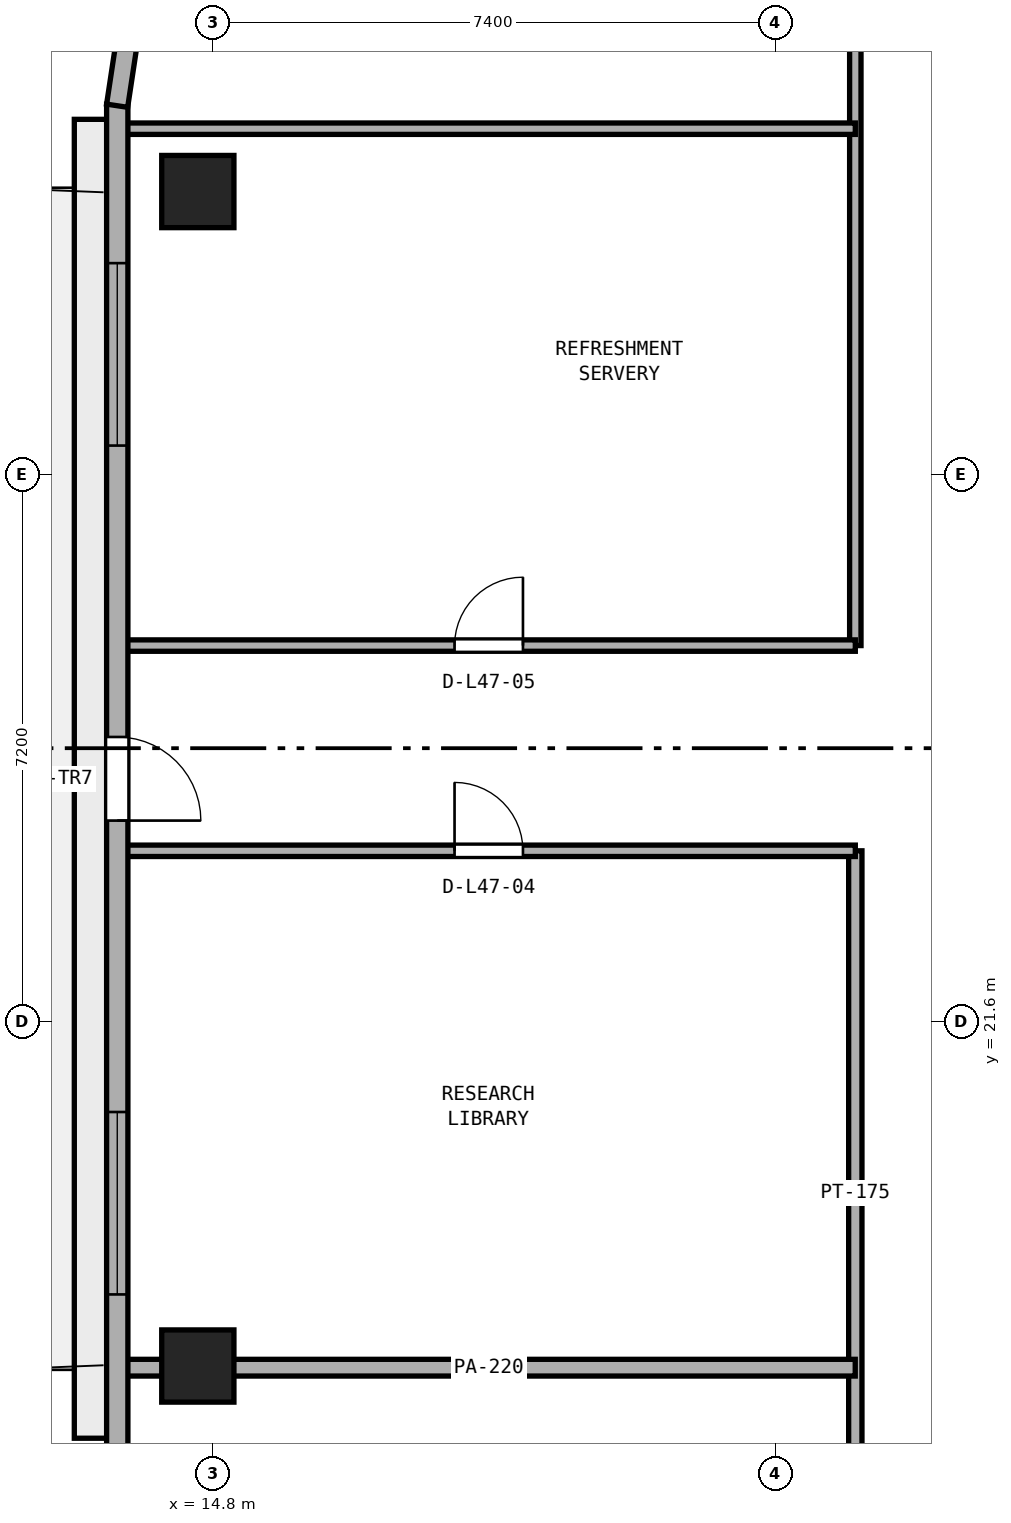
"""IFC4 building model, lengths in metres.
Left out: names, types, materials, properties, quantities, classifications, styles, units other than length and angle.
Written with IfcOpenShell. Run it as: python <this file> out.ifc"""

import sys

from ifc_helpers import new_model, si_unit, direction, frame, frame_2d, origin, origin_2d, place, context, subcontext, project, spatial, rectangle, extrude, element, fill, save


model = new_model("IFC4")
c1 = context("Model", 3, precision=1e-05, world=origin(), true_north=direction((0.0, 1.0)))
c2 = subcontext(c1, "Body", "Model", "MODEL_VIEW")
j1 = project(units=[si_unit("LENGTHUNIT", "METRE"), si_unit("PLANEANGLEUNIT", "RADIAN")], contexts=[c1])
p1 = place(None, origin())
s1 = spatial("IfcSite", under=j1, at=p1, CompositionType="ELEMENT")
p2 = place(p1, origin())
s2 = spatial("IfcBuilding", under=s1, at=p2, CompositionType="ELEMENT")
p3 = place(p2, frame((0.0, 0.0, 185.8)))
s3 = spatial("IfcBuildingStorey", under=s2, at=p3, CompositionType="ELEMENT", Elevation=185.8)
for number, where, z_axis, x_axis in (
    (1, (14.6, 32.523, 0.0), (0.0, 0.0, 1.0), (1.0, 0.0, 0.0)),
    (2, (14.6, 17.072, 0.0), (0.0, 0.0, 1.0), (1.0, 0.0, 0.0)),
):
    element("IfcColumn", number, at=place(p3, frame(where, z_axis=z_axis, x_axis=x_axis)), inside=s3, PredefinedType="COLUMN", context=c2, shape_type="SweptSolid", body=[
        extrude(rectangle(XDim=0.95, YDim=0.95, at=origin_2d()), origin(), (0.0, 0.0, 1.0), 3.8),
    ])
p4 = place(p3, frame((23.25, 14.85, 0.0), z_axis=(0.0, 0.0, 1.0), x_axis=(0.0, 1.0, 0.0)))
e3 = element("IfcWall", 3, at=p4, inside=s3, PredefinedType="PARTITIONING", context=c2, shape_type="SweptSolid", body=[
    extrude(rectangle(XDim=9.0, YDim=0.175, at=frame_2d((4.5, 0.0))), origin(), (0.0, 0.0, 1.0), 3.54),
])
p5 = place(p3, frame((23.25, 26.55, 0.0), z_axis=(0.0, 0.0, 1.0), x_axis=(0.0, 1.0, 0.0)))
e4 = element("IfcWall", 4, at=p5, inside=s3, PredefinedType="PARTITIONING", context=c2, shape_type="SweptSolid", body=[
    extrude(rectangle(XDim=9.0, YDim=0.15, at=frame_2d((4.5, 0.0))), origin(), (0.0, 0.0, 1.0), 3.54),
])
p6 = place(p3, frame((13.605, 17.05, 0.0), z_axis=(0.0, 0.0, 1.0), x_axis=(1.0, 0.0, 0.0)))
e5 = element("IfcWall", 5, at=p6, inside=s3, PredefinedType="PARTITIONING", context=c2, shape_type="SweptSolid", body=[
    extrude(rectangle(XDim=9.644, YDim=0.22, at=frame_2d((4.822, 0.0))), origin(), (0.0, 0.0, 1.0), 2.923),
])
p7 = place(p3, frame((13.605, 23.85, 0.0), z_axis=(0.0, 0.0, 1.0), x_axis=(1.0, 0.0, 0.0)))
e6 = element("IfcWall", 6, at=p7, inside=s3, PredefinedType="PARTITIONING", context=c2, shape_type="SweptSolid", body=[
    extrude(rectangle(XDim=9.645, YDim=0.15, at=frame_2d((4.823, 0.0))), origin(), (0.0, 0.0, 1.0), 3.54),
])
p8 = place(p7, frame((4.373, 0.0, 0.0)))
e7 = element("IfcOpeningElement", 7, at=p8, cuts=e6, PredefinedType="OPENING", context=c2, shape_type="SweptSolid", body=[
    extrude(rectangle(XDim=0.9, YDim=2.1, at=frame_2d((0.45, 1.05))), frame((0.0, 0.085, 0.0), z_axis=(0.0, -1.0, 0.0), x_axis=(1.0, 0.0, 0.0)), (0.0, 0.0, 1.0), 0.17),
])
p9 = place(p3, frame((13.605, 26.55, 0.0), z_axis=(0.0, 0.0, 1.0), x_axis=(1.0, 0.0, 0.0)))
e8 = element("IfcWall", 8, at=p9, inside=s3, PredefinedType="PARTITIONING", context=c2, shape_type="SweptSolid", body=[
    extrude(rectangle(XDim=9.645, YDim=0.15, at=frame_2d((4.823, 0.0))), origin(), (0.0, 0.0, 1.0), 3.54),
])
p10 = place(p9, frame((4.373, 0.0, 0.0)))
e9 = element("IfcOpeningElement", 9, at=p10, cuts=e8, PredefinedType="OPENING", context=c2, shape_type="SweptSolid", body=[
    extrude(rectangle(XDim=0.9, YDim=2.1, at=frame_2d((0.45, 1.05))), frame((0.0, 0.085, 0.0), z_axis=(0.0, -1.0, 0.0), x_axis=(1.0, 0.0, 0.0)), (0.0, 0.0, 1.0), 0.17),
])
p11 = place(p3, frame((13.605, 33.35, 0.0), z_axis=(0.0, 0.0, 1.0), x_axis=(1.0, 0.0, 0.0)))
e10 = element("IfcWall", 10, at=p11, inside=s3, PredefinedType="PARTITIONING", context=c2, shape_type="SweptSolid", body=[
    extrude(rectangle(XDim=9.645, YDim=0.15, at=frame_2d((4.823, 0.0))), origin(), (0.0, 0.0, 1.0), 3.54),
])
p12 = place(p3, frame((13.54, 33.673, 0.0), z_axis=(0.0, 0.0, 1.0), x_axis=(0.0, -1.0, 0.0)))
e11 = element("IfcWall", 11, at=p12, inside=s3, PredefinedType="STANDARD", context=c2, shape_type="SweptSolid", body=[
    extrude(rectangle(XDim=17.751, YDim=0.28, at=frame_2d((8.875, 0.0))), origin(), (0.0, 0.0, 1.0), 3.54),
])
p13 = place(p12, frame((8.326, 0.0, 0.0)))
e12 = element("IfcOpeningElement", 12, at=p13, cuts=e11, PredefinedType="OPENING", context=c2, shape_type="SweptSolid", body=[
    extrude(rectangle(XDim=1.1, YDim=2.2, at=frame_2d((0.55, 1.1))), frame((0.0, 0.15, 0.0), z_axis=(0.0, -1.0, 0.0), x_axis=(1.0, 0.0, 0.0)), (0.0, 0.0, 1.0), 0.3),
])
p14 = place(p12, frame((2.092, 0.0, 0.9)))
e13 = element("IfcOpeningElement", 13, at=p14, cuts=e11, PredefinedType="OPENING", context=c2, shape_type="SweptSolid", body=[
    extrude(rectangle(XDim=2.4, YDim=1.75, at=frame_2d((1.2, 0.875))), frame((0.0, 0.15, 0.0), z_axis=(0.0, -1.0, 0.0), x_axis=(1.0, 0.0, 0.0)), (0.0, 0.0, 1.0), 0.3),
])
p15 = place(p12, frame((13.26, 0.0, 0.9)))
e14 = element("IfcOpeningElement", 14, at=p15, cuts=e11, PredefinedType="OPENING", context=c2, shape_type="SweptSolid", body=[
    extrude(rectangle(XDim=2.4, YDim=1.75, at=frame_2d((1.2, 0.875))), frame((0.0, 0.15, 0.0), z_axis=(0.0, -1.0, 0.0), x_axis=(1.0, 0.0, 0.0)), (0.0, 0.0, 1.0), 0.3),
])
p16 = place(p3, frame((13.699, 34.716, 0.0), z_axis=(0.0, 0.0, 1.0), x_axis=(-0.149549920187, -0.988754176412, 0.0)))
e15 = element("IfcWall", 15, at=p16, inside=s3, PredefinedType="STANDARD", context=c2, shape_type="SweptSolid", body=[
    extrude(rectangle(XDim=1.076, YDim=0.28, at=frame_2d((0.538, 0.0))), origin(), (0.0, 0.0, 1.0), 3.54),
])
p17 = place(p8, origin())
e16 = element("IfcDoor", 16, at=p17, inside=s3, OperationType="SINGLE_SWING_LEFT", PredefinedType="DOOR", context=c2, shape_type="SweptSolid", body=[
    extrude(rectangle(XDim=0.9, YDim=2.1, at=frame_2d((0.45, 1.05))), frame((0.0, 0.025, 0.0), z_axis=(0.0, -1.0, 0.0), x_axis=(1.0, 0.0, 0.0)), (0.0, 0.0, 1.0), 0.05),
])
fill(e7, e16)
p18 = place(p10, origin())
e17 = element("IfcDoor", 17, at=p18, inside=s3, OperationType="SINGLE_SWING_RIGHT", PredefinedType="DOOR", context=c2, shape_type="SweptSolid", body=[
    extrude(rectangle(XDim=0.9, YDim=2.1, at=frame_2d((0.45, 1.05))), frame((0.0, 0.025, 0.0), z_axis=(0.0, -1.0, 0.0), x_axis=(1.0, 0.0, 0.0)), (0.0, 0.0, 1.0), 0.05),
])
fill(e9, e17)
p19 = place(p13, origin())
e18 = element("IfcDoor", 18, at=p19, inside=s3, OperationType="SINGLE_SWING_RIGHT", PredefinedType="DOOR", context=c2, shape_type="SweptSolid", body=[
    extrude(rectangle(XDim=1.1, YDim=2.2, at=frame_2d((0.55, 1.1))), frame((0.0, 0.025, 0.0), z_axis=(0.0, -1.0, 0.0), x_axis=(1.0, 0.0, 0.0)), (0.0, 0.0, 1.0), 0.05),
])
fill(e12, e18)
p20 = place(p14, origin())
e19 = element("IfcWindow", 19, at=p20, inside=s3, PartitioningType="SINGLE_PANEL", PredefinedType="WINDOW", context=c2, shape_type="SweptSolid", body=[
    extrude(rectangle(XDim=2.4, YDim=1.75, at=frame_2d((1.2, 0.875))), frame((0.0, 0.03, 0.0), z_axis=(0.0, -1.0, 0.0), x_axis=(1.0, 0.0, 0.0)), (0.0, 0.0, 1.0), 0.06),
])
fill(e13, e19)
p21 = place(p15, origin())
e20 = element("IfcWindow", 20, at=p21, inside=s3, PartitioningType="SINGLE_PANEL", PredefinedType="WINDOW", context=c2, shape_type="SweptSolid", body=[
    extrude(rectangle(XDim=2.4, YDim=1.75, at=frame_2d((1.2, 0.875))), frame((0.0, 0.03, 0.0), z_axis=(0.0, -1.0, 0.0), x_axis=(1.0, 0.0, 0.0)), (0.0, 0.0, 1.0), 0.06),
])
fill(e14, e20)
save(model, sys.argv[1])
